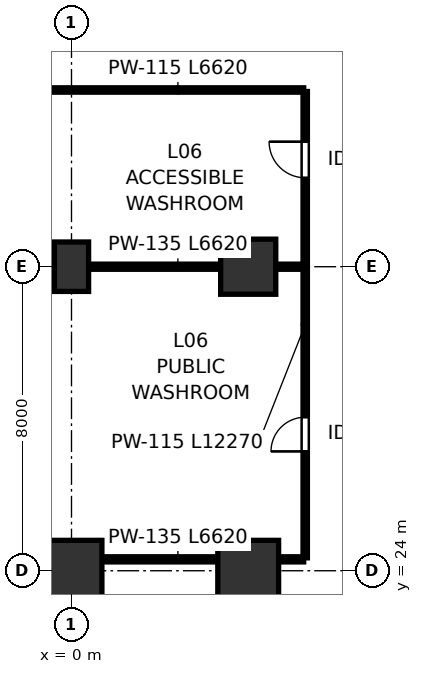
"""IFC4 building model, lengths in metres.
Left out: names, types, materials, properties, quantities, classifications, styles, units other than length and angle.
Written with IfcOpenShell. Run it as: python <this file> out.ifc"""

import sys

from ifc_helpers import new_model, si_unit, direction, frame, frame_2d, origin, origin_2d, place, context, subcontext, project, spatial, rectangle, extrude, clip, halfspace, source, transform, mapped, element, fill, save


model = new_model("IFC4")
c1 = context("Model", 3, precision=1e-05, world=origin(), true_north=direction((0.0, 1.0)))
c2 = subcontext(c1, "Body", "Model", "MODEL_VIEW")
j1 = project(units=[si_unit("LENGTHUNIT", "METRE"), si_unit("PLANEANGLEUNIT", "RADIAN")], contexts=[c1])
p1 = place(None, origin())
s1 = spatial("IfcSite", under=j1, at=p1, CompositionType="ELEMENT")
p2 = place(p1, origin())
s2 = spatial("IfcBuilding", under=s1, at=p2, CompositionType="ELEMENT")
p3 = place(p2, frame((0.0, 0.0, 28.0)))
s3 = spatial("IfcBuildingStorey", under=s2, at=p3, CompositionType="ELEMENT", Elevation=28.0)
m1 = source(origin(), c2, "Body", "SweptSolid", [
    extrude(rectangle(XDim=1.6, YDim=1.6, at=origin_2d()), origin(), (0.0, 0.0, 1.0), 4.599),
])
p4 = place(p3, frame((0.0, 24.0, 0.001), z_axis=(0.0, 0.0, 1.0), x_axis=(1.0, 0.0, 0.0)))
e1 = element("IfcColumn", 1, at=p4, inside=s3, PredefinedType="COLUMN", context=c2, shape_type="MappedRepresentation", body=[
    mapped(m1, transform((0.0, 0.0, 0.0), scale=1.0)),
])
m2 = source(origin(), c2, "Body", "SweptSolid", [
    extrude(rectangle(XDim=0.9, YDim=1.3, at=origin_2d()), origin(), (0.0, 0.0, 1.0), 4.599),
])
p5 = place(p3, frame((0.0, 32.0, 0.001), z_axis=(0.0, 0.0, 1.0), x_axis=(1.0, 0.0, 0.0)))
e2 = element("IfcColumn", 2, at=p5, inside=s3, PredefinedType="PILASTER", context=c2, shape_type="MappedRepresentation", body=[
    mapped(m2, transform((0.0, 0.0, 0.0), scale=1.0)),
])
p6 = place(p3, frame((4.65, 24.0, 0.0), z_axis=(-0.068349662981, 0.152545616132, 0.985930098217), x_axis=(-0.912582674782, -0.408892237255, 0.0)))
e3 = element("IfcColumn", 3, at=p6, inside=s3, PredefinedType="COLUMN", context=c2, shape_type="Clipping", body=[
    clip(clip(extrude(rectangle(XDim=1.6, YDim=1.6, at=origin_2d()), origin(), (0.0, 0.0, 1.0), 4.869), halfspace(frame((0.0, 0.0, 0.136), z_axis=(0.0, 0.0, -1.0), x_axis=(1.0, 0.0, 0.0)), False)), halfspace(frame((0.0, 0.0, 4.732), z_axis=(0.0, 0.0, 1.0), x_axis=(1.0, 0.0, 0.0)), False)),
])
p7 = place(p3, frame((4.65, 32.0, 0.0), z_axis=(0.003318194609, 0.151380060121, 0.988470063777), x_axis=(-0.999759851488, 0.021914364065, 0.0)))
e4 = element("IfcColumn", 4, at=p7, inside=s3, PredefinedType="COLUMN", context=c2, shape_type="Clipping", body=[
    clip(clip(extrude(rectangle(XDim=1.45, YDim=1.45, at=origin_2d()), origin(), (0.0, 0.0, 1.0), 4.856), halfspace(frame((0.0, 0.0, 0.112), z_axis=(0.0, 0.0, -1.0), x_axis=(1.0, 0.0, 0.0)), False)), halfspace(frame((0.0, 0.0, 4.744), z_axis=(0.0, 0.0, 1.0), x_axis=(1.0, 0.0, 0.0)), False)),
])
p8 = place(p3, frame((-0.51, 24.3, 0.0), z_axis=(0.0, 0.0, 1.0), x_axis=(1.0, 0.0, 0.0)))
e5 = element("IfcWall", 5, at=p8, inside=s3, PredefinedType="PARTITIONING", context=c2, shape_type="SweptSolid", body=[
    extrude(rectangle(XDim=6.62, YDim=0.135, at=frame_2d((3.31, 0.0))), origin(), (0.0, 0.0, 1.0), 3.792),
])
p9 = place(p3, frame((-0.51, 36.65, 0.0), z_axis=(0.0, 0.0, 1.0), x_axis=(1.0, 0.0, 0.0)))
e6 = element("IfcWall", 6, at=p9, inside=s3, PredefinedType="PARTITIONING", context=c2, shape_type="SweptSolid", body=[
    extrude(rectangle(XDim=6.62, YDim=0.115, at=frame_2d((3.31, 0.0))), origin(), (0.0, 0.0, 1.0), 3.655),
])
p10 = place(p3, frame((-0.51, 32.0, 0.0), z_axis=(0.0, 0.0, 1.0), x_axis=(1.0, 0.0, 0.0)))
e7 = element("IfcWall", 7, at=p10, inside=s3, PredefinedType="PARTITIONING", context=c2, shape_type="SweptSolid", body=[
    extrude(rectangle(XDim=6.62, YDim=0.135, at=frame_2d((3.31, 0.0))), origin(), (0.0, 0.0, 1.0), 3.655),
])
p11 = place(p3, frame((6.15, 24.34, 0.0), z_axis=(0.0, 0.0, 1.0), x_axis=(0.0, 1.0, 0.0)))
e8 = element("IfcWall", 8, at=p11, inside=s3, PredefinedType="PARTITIONING", context=c2, shape_type="SweptSolid", body=[
    extrude(rectangle(XDim=12.27, YDim=0.115, at=frame_2d((6.135, 0.0))), origin(), (0.0, 0.0, 1.0), 3.792),
])
p12 = place(p11, frame((2.8, 0.0, 0.0)))
e9 = element("IfcOpeningElement", 9, at=p12, cuts=e8, PredefinedType="OPENING", context=c2, shape_type="SweptSolid", body=[
    extrude(rectangle(XDim=0.9, YDim=2.15, at=frame_2d((0.45, 1.075))), frame((0.0, 0.067, 0.0), z_axis=(0.0, -1.0, 0.0), x_axis=(1.0, 0.0, 0.0)), (0.0, 0.0, 1.0), 0.135),
])
p13 = place(p11, frame((10.0, 0.0, 0.0)))
e10 = element("IfcOpeningElement", 10, at=p13, cuts=e8, PredefinedType="OPENING", context=c2, shape_type="SweptSolid", body=[
    extrude(rectangle(XDim=0.95, YDim=2.15, at=frame_2d((0.475, 1.075))), frame((0.0, 0.067, 0.0), z_axis=(0.0, -1.0, 0.0), x_axis=(1.0, 0.0, 0.0)), (0.0, 0.0, 1.0), 0.135),
])
m3 = source(origin(), c2, "Body", "SweptSolid", [
    extrude(rectangle(XDim=0.9, YDim=2.15, at=frame_2d((0.45, 1.075))), frame((0.0, 0.025, 0.0), z_axis=(0.0, -1.0, 0.0), x_axis=(1.0, 0.0, 0.0)), (0.0, 0.0, 1.0), 0.05),
])
p14 = place(p12, origin())
e11 = element("IfcDoor", 11, at=p14, inside=s3, OperationType="SINGLE_SWING_LEFT", PredefinedType="DOOR", context=c2, shape_type="MappedRepresentation", body=[
    mapped(m3, transform((0.0, 0.0, 0.0), scale=1.0)),
])
fill(e9, e11)
m4 = source(origin(), c2, "Body", "SweptSolid", [
    extrude(rectangle(XDim=0.95, YDim=2.15, at=frame_2d((0.475, 1.075))), frame((0.0, 0.025, 0.0), z_axis=(0.0, -1.0, 0.0), x_axis=(1.0, 0.0, 0.0)), (0.0, 0.0, 1.0), 0.05),
])
p15 = place(p13, origin())
e12 = element("IfcDoor", 12, at=p15, inside=s3, OperationType="SINGLE_SWING_RIGHT", PredefinedType="DOOR", context=c2, shape_type="MappedRepresentation", body=[
    mapped(m4, transform((0.0, 0.0, 0.0), scale=1.0)),
])
fill(e10, e12)
save(model, sys.argv[1])
